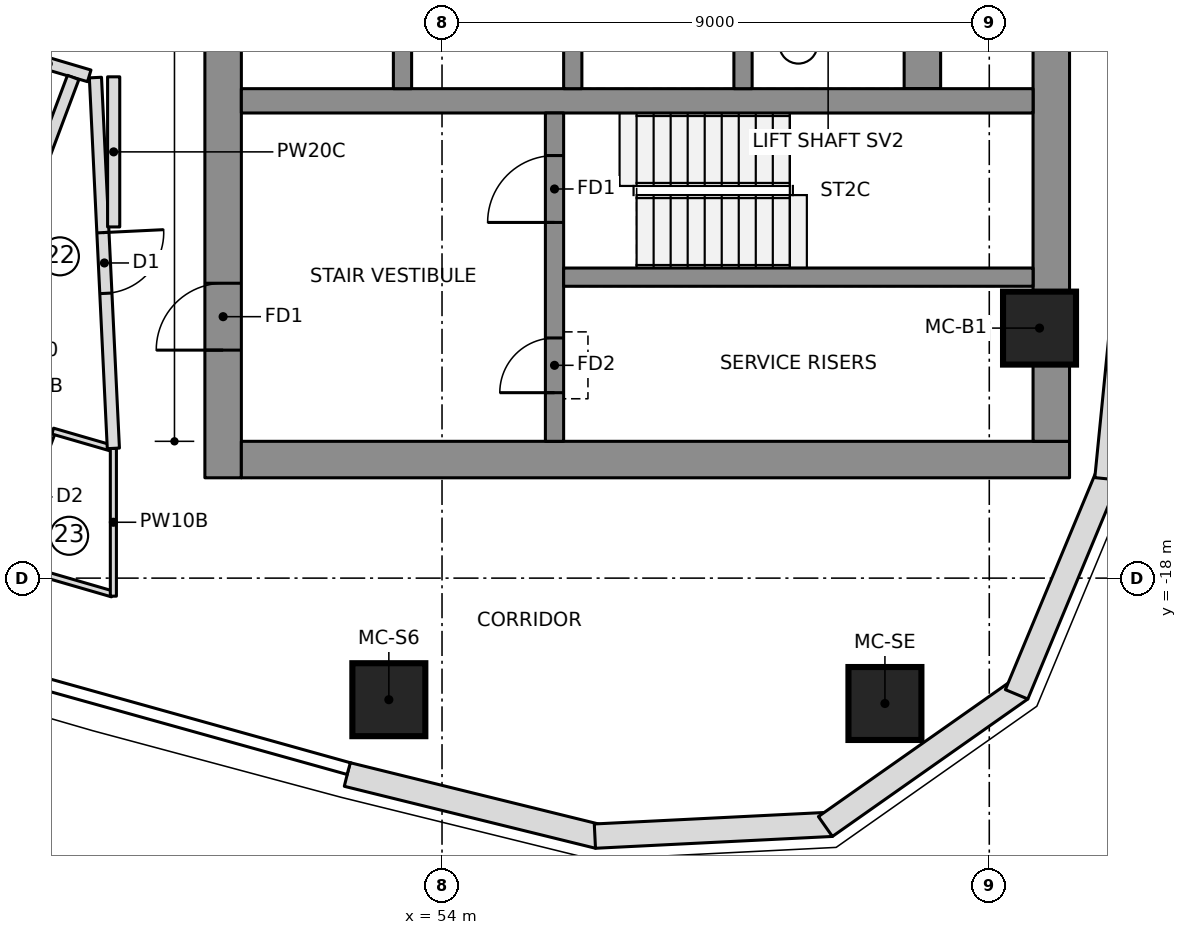
"""IFC4 building model, lengths in metres.
Left out: names, types, materials, properties, quantities, classifications, styles, units other than length and angle.
Written with IfcOpenShell. Run it as: python <this file> out.ifc"""

import sys

from ifc_helpers import new_model, si_unit, direction, frame, frame_2d, origin, origin_2d, place, context, subcontext, project, spatial, polyline, rectangle, outline, extrude, element, fill, save


model = new_model("IFC4")
c1 = context("Model", 3, precision=1e-05, world=origin(), true_north=direction((0.0, 1.0)))
c2 = subcontext(c1, "Body", "Model", "MODEL_VIEW")
j1 = project(units=[si_unit("LENGTHUNIT", "METRE"), si_unit("PLANEANGLEUNIT", "RADIAN")], contexts=[c1])
p1 = place(None, origin())
s1 = spatial("IfcSite", under=j1, at=p1, CompositionType="ELEMENT")
p2 = place(p1, origin())
s2 = spatial("IfcBuilding", under=s1, at=p2, CompositionType="ELEMENT")
p3 = place(p2, frame((0.0, 0.0, 249.2)))
s3 = spatial("IfcBuildingStorey", under=s2, at=p3, CompositionType="ELEMENT", Elevation=249.2)
p4 = place(p3, frame((50.4, -16.35, 0.0), z_axis=(0.0, 0.0, 1.0), x_axis=(0.0, 1.0, 0.0)))
e1 = element("IfcWall", 1, at=p4, inside=s3, PredefinedType="SHEAR", context=c2, shape_type="SweptSolid", body=[
    extrude(rectangle(XDim=9.7, YDim=0.6, at=frame_2d((4.85, 0.0))), origin(), (0.0, 0.0, 1.0), 3.55),
])
p5 = place(p4, frame((2.1, 0.0, 0.0)))
e2 = element("IfcOpeningElement", 2, at=p5, cuts=e1, PredefinedType="OPENING", context=c2, shape_type="SweptSolid", body=[
    extrude(rectangle(XDim=1.1, YDim=2.1, at=frame_2d((0.55, 1.05))), frame((0.0, 0.31, 0.0), z_axis=(0.0, -1.0, 0.0), x_axis=(1.0, 0.0, 0.0)), (0.0, 0.0, 1.0), 0.62),
])
p6 = place(p3, frame((50.7, -16.05, 0.0), z_axis=(0.0, 0.0, 1.0), x_axis=(1.0, 0.0, 0.0)))
e3 = element("IfcWall", 3, at=p6, inside=s3, PredefinedType="SHEAR", context=c2, shape_type="SweptSolid", body=[
    extrude(rectangle(XDim=13.62, YDim=0.6, at=frame_2d((6.81, 0.0))), origin(), (0.0, 0.0, 1.0), 3.55),
])
p7 = place(p3, frame((64.02, -15.75, 0.0), z_axis=(0.0, 0.0, 1.0), x_axis=(0.0, 1.0, 0.0)))
e4 = element("IfcWall", 4, at=p7, inside=s3, PredefinedType="SHEAR", context=c2, shape_type="SweptSolid", body=[
    extrude(rectangle(XDim=8.248, YDim=0.6, at=frame_2d((4.124, 0.0))), origin(), (0.0, 0.0, 1.0), 3.55),
])
p8 = place(p3, frame((61.9, -9.95, 0.0), z_axis=(0.0, 0.0, 1.0), x_axis=(0.0, 1.0, 0.0)))
e5 = element("IfcWall", 5, at=p8, inside=s3, PredefinedType="SHEAR", context=c2, shape_type="SweptSolid", body=[
    extrude(rectangle(XDim=19.9, YDim=0.6, at=frame_2d((9.95, 0.0))), origin(), (0.0, 0.0, 1.0), 3.55),
])
p9 = place(p3, frame((50.7, -10.15, 0.0), z_axis=(0.0, 0.0, 1.0), x_axis=(1.0, 0.0, 0.0)))
e6 = element("IfcWall", 6, at=p9, inside=s3, PredefinedType="SHEAR", context=c2, shape_type="SweptSolid", body=[
    extrude(rectangle(XDim=13.02, YDim=0.4, at=frame_2d((6.51, 0.0))), origin(), (0.0, 0.0, 1.0), 3.55),
])
for number, where, z_axis, x_axis in (
    (7, (53.35, -9.95, 0.0), (0.0, 0.0, 1.0), (0.0, 1.0, 0.0)),
    (8, (56.15, -9.95, 0.0), (0.0, 0.0, 1.0), (0.0, 1.0, 0.0)),
    (9, (58.95, -9.95, 0.0), (0.0, 0.0, 1.0), (0.0, 1.0, 0.0)),
):
    element("IfcWall", number, at=place(p3, frame(where, z_axis=z_axis, x_axis=x_axis)), inside=s3, PredefinedType="SHEAR", context=c2, shape_type="SweptSolid", body=[
        extrude(rectangle(XDim=3.0, YDim=0.3, at=frame_2d((1.5, 0.0))), origin(), (0.0, 0.0, 1.0), 3.55),
    ])
p10 = place(p3, frame((55.85, -15.75, 0.0), z_axis=(0.0, 0.0, 1.0), x_axis=(0.0, 1.0, 0.0)))
e10 = element("IfcWall", 10, at=p10, inside=s3, PredefinedType="SHEAR", context=c2, shape_type="SweptSolid", body=[
    extrude(rectangle(XDim=5.4, YDim=0.3, at=frame_2d((2.7, 0.0))), origin(), (0.0, 0.0, 1.0), 3.55),
])
p11 = place(p10, frame((3.6, 0.0, 0.0)))
e11 = element("IfcOpeningElement", 11, at=p11, cuts=e10, PredefinedType="OPENING", context=c2, shape_type="SweptSolid", body=[
    extrude(rectangle(XDim=1.1, YDim=2.1, at=frame_2d((0.55, 1.05))), frame((0.0, 0.16, 0.0), z_axis=(0.0, -1.0, 0.0), x_axis=(1.0, 0.0, 0.0)), (0.0, 0.0, 1.0), 0.32),
])
p12 = place(p10, frame((0.8, 0.0, 0.0)))
e12 = element("IfcOpeningElement", 12, at=p12, cuts=e10, PredefinedType="OPENING", context=c2, shape_type="SweptSolid", body=[
    extrude(rectangle(XDim=0.9, YDim=2.1, at=frame_2d((0.45, 1.05))), frame((0.0, 0.16, 0.0), z_axis=(0.0, -1.0, 0.0), x_axis=(1.0, 0.0, 0.0)), (0.0, 0.0, 1.0), 0.32),
])
p13 = place(p3, frame((56.0, -13.05, 0.0), z_axis=(0.0, 0.0, 1.0), x_axis=(1.0, 0.0, 0.0)))
e13 = element("IfcWall", 13, at=p13, inside=s3, PredefinedType="SHEAR", context=c2, shape_type="SweptSolid", body=[
    extrude(rectangle(XDim=7.72, YDim=0.3, at=frame_2d((3.86, 0.0))), origin(), (0.0, 0.0, 1.0), 3.55),
])
for number, where, z_axis, x_axis in (
    (14, (53.125, -20.0, 0.0), (0.0, 0.0, 1.0), (1.0, 0.0, 0.0)),
    (15, (61.284, -20.062, 0.0), (0.0, 0.0, 1.0), (1.0, 0.0, 0.0)),
    (16, (63.826, -13.888, 0.0), (0.0, 0.0, 1.0), (1.0, 0.0, 0.0)),
):
    element("IfcColumn", number, at=place(p3, frame(where, z_axis=z_axis, x_axis=x_axis)), inside=s3, PredefinedType="COLUMN", context=c2, shape_type="SweptSolid", body=[
        extrude(rectangle(XDim=1.2, YDim=1.2, at=origin_2d()), origin(), (0.0, 0.0, 1.0), 3.55),
    ])
p14 = place(p3, frame((52.441, -21.23, 0.0), z_axis=(0.0, 0.0, 1.0), x_axis=(0.970902342456, -0.23947576373, 0.0)))
e17 = element("IfcWall", 17, at=p14, inside=s3, PredefinedType="NOTDEFINED", context=c2, shape_type="SweptSolid", body=[
    extrude(outline(polyline([(0.0, -0.2), (4.255, -0.2), (4.197, 0.2), (0.0, 0.2), (0.0, -0.2)])), origin(), (0.0, 0.0, 1.0), 3.25),
])
p15 = place(p3, frame((56.543, -22.242, 0.0), z_axis=(0.0, 0.0, 1.0), x_axis=(0.998758875872, 0.049806705046, 0.0)))
e18 = element("IfcWall", 18, at=p15, inside=s3, PredefinedType="NOTDEFINED", context=c2, shape_type="SweptSolid", body=[
    extrude(outline(polyline([(-0.029, -0.2), (3.871, -0.2), (3.756, 0.2), (0.029, 0.2), (-0.029, -0.2)])), origin(), (0.0, 0.0, 1.0), 3.25),
])
p16 = place(p3, frame((60.352, -22.052, 0.0), z_axis=(0.0, 0.0, 1.0), x_axis=(0.817942545532, 0.575299915009, 0.0)))
e19 = element("IfcWall", 19, at=p16, inside=s3, PredefinedType="NOTDEFINED", context=c2, shape_type="SweptSolid", body=[
    extrude(outline(polyline([(-0.058, -0.2), (3.871, -0.2), (3.756, 0.2), (0.058, 0.2), (-0.058, -0.2)])), origin(), (0.0, 0.0, 1.0), 3.25),
])
p17 = place(p3, frame((63.471, -19.858, 0.0), z_axis=(0.0, 0.0, 1.0), x_axis=(0.3844335483, 0.923152667191, 0.0)))
e20 = element("IfcWall", 20, at=p17, inside=s3, PredefinedType="NOTDEFINED", context=c2, shape_type="SweptSolid", body=[
    extrude(outline(polyline([(-0.058, -0.2), (3.843, -0.2), (3.784, 0.2), (0.058, 0.2), (-0.058, -0.2)])), origin(), (0.0, 0.0, 1.0), 3.25),
])
p18 = place(p3, frame((64.938, -16.337, 0.0), z_axis=(0.0, 0.0, 1.0), x_axis=(0.098718218066, 0.995115427185, 0.0)))
e21 = element("IfcWall", 21, at=p18, inside=s3, PredefinedType="NOTDEFINED", context=c2, shape_type="SweptSolid", body=[
    extrude(outline(polyline([(-0.03, -0.2), (4.096, -0.2), (4.09, 0.2), (0.03, 0.2), (-0.03, -0.2)])), origin(), (0.0, 0.0, 1.0), 3.25),
])
p19 = place(p3, frame((46.85, -9.34, 0.0), z_axis=(0.0, 0.0, 1.0), x_axis=(0.958866391875, -0.283857785753, 0.0)))
e22 = element("IfcWall", 22, at=p19, inside=s3, PredefinedType="PARTITIONING", context=c2, shape_type="SweptSolid", body=[
    extrude(rectangle(XDim=1.406, YDim=0.2, at=frame_2d((0.703, 0.0))), origin(), (0.0, 0.0, 1.0), 3.25),
])
p20 = place(p3, frame((44.56, -18.762, 0.0), z_axis=(0.0, 0.0, 1.0), x_axis=(0.35112901071, 0.936327089129, 0.0)))
e23 = element("IfcWall", 23, at=p20, inside=s3, PredefinedType="PARTITIONING", context=c2, shape_type="SweptSolid", body=[
    extrude(rectangle(XDim=9.608, YDim=0.2, at=frame_2d((4.804, 0.0))), origin(), (0.0, 0.0, 1.0), 3.25),
])
p21 = place(p3, frame((46.788, -17.741, 0.0), z_axis=(0.0, 0.0, 1.0), x_axis=(0.351158236187, 0.936316128857, 0.0)))
e24 = element("IfcWall", 24, at=p21, inside=s3, PredefinedType="PARTITIONING", context=c2, shape_type="SweptSolid", body=[
    extrude(rectangle(XDim=2.307, YDim=0.1, at=frame_2d((1.153, 0.0))), origin(), (0.0, 0.0, 1.0), 3.25),
])
p22 = place(p21, frame((0.75, 0.0, 0.0)))
e25 = element("IfcOpeningElement", 25, at=p22, cuts=e24, PredefinedType="OPENING", context=c2, shape_type="SweptSolid", body=[
    extrude(rectangle(XDim=0.8, YDim=2.1, at=frame_2d((0.4, 1.05))), frame((0.0, 0.06, 0.0), z_axis=(0.0, -1.0, 0.0), x_axis=(1.0, 0.0, 0.0)), (0.0, 0.0, 1.0), 0.12),
])
p23 = place(p3, frame((47.598, -15.582, 0.0), z_axis=(0.0, 0.0, 1.0), x_axis=(0.960468222897, -0.278389642057, 0.0)))
e26 = element("IfcWall", 26, at=p23, inside=s3, PredefinedType="PARTITIONING", context=c2, shape_type="SweptSolid", body=[
    extrude(rectangle(XDim=1.019, YDim=0.1, at=frame_2d((0.51, 0.0))), origin(), (0.0, 0.0, 1.0), 3.25),
])
p24 = place(p3, frame((48.578, -18.26, 0.0), z_axis=(0.0, 0.0, 1.0), x_axis=(-0.960473980386, 0.278369777458, 0.0)))
e27 = element("IfcWall", 27, at=p24, inside=s3, PredefinedType="PARTITIONING", context=c2, shape_type="SweptSolid", body=[
    extrude(rectangle(XDim=1.864, YDim=0.1, at=frame_2d((0.932, 0.0))), origin(), (0.0, 0.0, 1.0), 3.25),
])
p25 = place(p3, frame((48.595, -15.866, 0.0), z_axis=(0.0, 0.0, 1.0), x_axis=(0.0, -1.0, 0.0)))
e28 = element("IfcWall", 28, at=p25, inside=s3, PredefinedType="PARTITIONING", context=c2, shape_type="SweptSolid", body=[
    extrude(rectangle(XDim=2.431, YDim=0.1, at=frame_2d((1.215, 0.0))), origin(), (0.0, 0.0, 1.0), 3.25),
])
p26 = place(p3, frame((48.3, -9.767, 0.0), z_axis=(0.0, 0.0, 1.0), x_axis=(0.048302241024, -0.998832765538, 0.0)))
e29 = element("IfcWall", 29, at=p26, inside=s3, PredefinedType="PARTITIONING", context=c2, shape_type="SweptSolid", body=[
    extrude(rectangle(XDim=6.106, YDim=0.2, at=frame_2d((3.053, 0.0))), origin(), (0.0, 0.0, 1.0), 3.25),
])
p27 = place(p26, frame((2.553, 0.0, 0.0)))
e30 = element("IfcOpeningElement", 30, at=p27, cuts=e29, PredefinedType="OPENING", context=c2, shape_type="SweptSolid", body=[
    extrude(rectangle(XDim=1.0, YDim=2.1, at=frame_2d((0.5, 1.05))), frame((0.0, 0.11, 0.0), z_axis=(0.0, -1.0, 0.0), x_axis=(1.0, 0.0, 0.0)), (0.0, 0.0, 1.0), 0.22),
])
p28 = place(p3, frame((48.6, -12.224, 0.0), z_axis=(0.0, 0.0, 1.0), x_axis=(0.0, 1.0, 0.0)))
e31 = element("IfcWall", 31, at=p28, inside=s3, PredefinedType="PARTITIONING", context=c2, shape_type="SweptSolid", body=[
    extrude(rectangle(XDim=2.469, YDim=0.2, at=frame_2d((1.234, 0.0))), origin(), (0.0, 0.0, 1.0), 3.25),
])
p29 = place(p27, origin())
e32 = element("IfcDoor", 32, at=p29, inside=s3, OperationType="SINGLE_SWING_LEFT", PredefinedType="DOOR", context=c2, shape_type="SweptSolid", body=[
    extrude(rectangle(XDim=1.0, YDim=2.1, at=frame_2d((0.5, 1.05))), frame((0.0, 0.025, 0.0), z_axis=(0.0, -1.0, 0.0), x_axis=(1.0, 0.0, 0.0)), (0.0, 0.0, 1.0), 0.05),
])
fill(e30, e32)
p30 = place(p11, origin())
e33 = element("IfcDoor", 33, at=p30, inside=s3, OperationType="SINGLE_SWING_RIGHT", PredefinedType="DOOR", context=c2, shape_type="SweptSolid", body=[
    extrude(rectangle(XDim=1.1, YDim=2.1, at=frame_2d((0.55, 1.05))), frame((0.0, 0.025, 0.0), z_axis=(0.0, -1.0, 0.0), x_axis=(1.0, 0.0, 0.0)), (0.0, 0.0, 1.0), 0.05),
])
fill(e11, e33)
p31 = place(p5, origin())
e34 = element("IfcDoor", 34, at=p31, inside=s3, OperationType="SINGLE_SWING_RIGHT", PredefinedType="DOOR", context=c2, shape_type="SweptSolid", body=[
    extrude(rectangle(XDim=1.1, YDim=2.1, at=frame_2d((0.55, 1.05))), frame((0.0, 0.025, 0.0), z_axis=(0.0, -1.0, 0.0), x_axis=(1.0, 0.0, 0.0)), (0.0, 0.0, 1.0), 0.05),
])
fill(e2, e34)
p32 = place(p12, origin())
e35 = element("IfcDoor", 35, at=p32, inside=s3, OperationType="SINGLE_SWING_LEFT", PredefinedType="DOOR", context=c2, shape_type="SweptSolid", body=[
    extrude(rectangle(XDim=0.9, YDim=2.1, at=frame_2d((0.45, 1.05))), frame((0.0, 0.025, 0.0), z_axis=(0.0, -1.0, 0.0), x_axis=(1.0, 0.0, 0.0)), (0.0, 0.0, 1.0), 0.05),
])
fill(e12, e35)
save(model, sys.argv[1])
